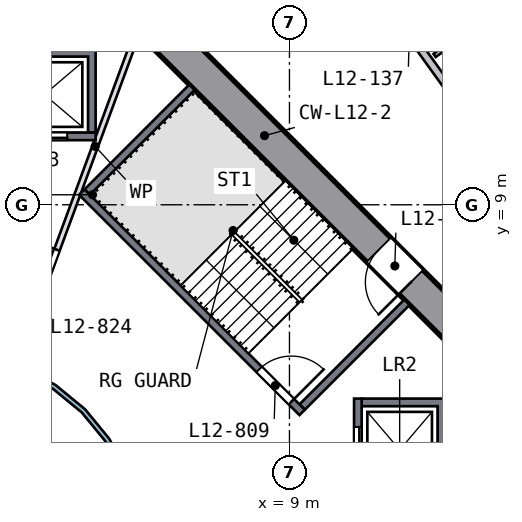
"""IFC4 building model, lengths in metres.
Left out: names, types, materials, properties, quantities, classifications, styles, units other than length and angle.
Written with IfcOpenShell. Run it as: python <this file> out.ifc"""

import sys

from ifc_helpers import new_model, si_unit, direction, frame, frame_2d, origin, place, context, subcontext, project, spatial, polyline, rectangle, outline, extrude, element, fill, save


model = new_model("IFC4")
c1 = context("Model", 3, precision=1e-05, world=origin(), true_north=direction((0.0, 1.0)))
c2 = subcontext(c1, "Body", "Model", "MODEL_VIEW")
j1 = project(units=[si_unit("LENGTHUNIT", "METRE"), si_unit("PLANEANGLEUNIT", "RADIAN")], contexts=[c1])
p1 = place(None, origin())
s1 = spatial("IfcSite", under=j1, at=p1, CompositionType="ELEMENT")
p2 = place(p1, origin())
s2 = spatial("IfcBuilding", under=s1, at=p2, CompositionType="ELEMENT")
p3 = place(p2, frame((0.0, 0.0, 56.5)))
s3 = spatial("IfcBuildingStorey", under=s2, at=p3, CompositionType="ELEMENT", Elevation=56.5)
p4 = place(p3, frame((13.682, 5.481, 0.0), z_axis=(0.0, 0.0, 1.0), x_axis=(-0.707106781, 0.707106781, 0.0)))
e1 = element("IfcWall", 1, at=p4, inside=s3, PredefinedType="SHEAR", context=c2, shape_type="SweptSolid", body=[
    extrude(rectangle(XDim=11.598, YDim=0.9, at=frame_2d((5.799, 0.0))), origin(), (0.0, 0.0, 1.0), 3.5),
])
p5 = place(p4, frame((2.099, 0.0, 0.0)))
e2 = element("IfcOpeningElement", 2, at=p5, cuts=e1, PredefinedType="OPENING", context=c2, shape_type="SweptSolid", body=[
    extrude(rectangle(XDim=1.2, YDim=2.1, at=frame_2d((0.6, 1.05))), frame((0.0, 0.46, 0.0), z_axis=(0.0, -1.0, 0.0), x_axis=(1.0, 0.0, 0.0)), (0.0, 0.0, 1.0), 0.92),
])
p6 = place(p3, origin())
e3 = element("IfcWall", 3, at=p6, inside=s3, PredefinedType="SOLIDWALL", context=c2, shape_type="SweptSolid", body=[
    extrude(outline(polyline([(13.1, 3.9), (13.1, 1.2), (10.9, 1.2), (10.9, 1.4), (12.9, 1.4), (12.9, 3.7), (10.9, 3.7), (10.9, 3.9), (13.1, 3.9)])), origin(), (0.0, 0.0, 1.0), 3.19),
])
p7 = place(p3, frame((10.8, 1.2, 0.0), z_axis=(0.0, 0.0, 1.0), x_axis=(0.0, 1.0, 0.0)))
e4 = element("IfcWall", 4, at=p7, inside=s3, PredefinedType="SOLIDWALL", context=c2, shape_type="SweptSolid", body=[
    extrude(rectangle(XDim=2.7, YDim=0.2, at=frame_2d((1.35, 0.0))), origin(), (0.0, 0.0, 1.0), 3.19),
])
p8 = place(p7, frame((0.75, 0.0, 0.0)))
e5 = element("IfcOpeningElement", 5, at=p8, cuts=e4, PredefinedType="OPENING", context=c2, shape_type="SweptSolid", body=[
    extrude(rectangle(XDim=1.2, YDim=2.1, at=frame_2d((0.6, 1.05))), frame((0.0, 0.11, 0.0), z_axis=(0.0, -1.0, 0.0), x_axis=(1.0, 0.0, 0.0)), (0.0, 0.0, 1.0), 0.22),
])
p9 = place(p3, origin())
e6 = element("IfcWall", 6, at=p9, inside=s3, PredefinedType="SOLIDWALL", context=c2, shape_type="SweptSolid", body=[
    extrude(outline(polyline([(3.9, 13.1), (3.9, 10.9), (3.7, 10.9), (3.7, 12.9), (1.4, 12.9), (1.4, 10.9), (1.2, 10.9), (1.2, 13.1), (3.9, 13.1)])), origin(), (0.0, 0.0, 1.0), 3.19),
])
p10 = place(p3, frame((1.2, 10.8, 0.0), z_axis=(0.0, 0.0, 1.0), x_axis=(1.0, 0.0, 0.0)))
e7 = element("IfcWall", 7, at=p10, inside=s3, PredefinedType="SOLIDWALL", context=c2, shape_type="SweptSolid", body=[
    extrude(rectangle(XDim=2.7, YDim=0.2, at=frame_2d((1.35, 0.0))), origin(), (0.0, 0.0, 1.0), 3.19),
])
p11 = place(p10, frame((0.75, 0.0, 0.0)))
e8 = element("IfcOpeningElement", 8, at=p11, cuts=e7, PredefinedType="OPENING", context=c2, shape_type="SweptSolid", body=[
    extrude(rectangle(XDim=1.2, YDim=2.1, at=frame_2d((0.6, 1.05))), frame((0.0, 0.11, 0.0), z_axis=(0.0, -1.0, 0.0), x_axis=(1.0, 0.0, 0.0)), (0.0, 0.0, 1.0), 0.22),
])
p12 = place(p3, frame((3.535, 9.334, 0.0), z_axis=(0.0, 0.0, 1.0), x_axis=(0.707106781, -0.707106781, 0.0)))
e9 = element("IfcWall", 9, at=p12, inside=s3, PredefinedType="SOLIDWALL", context=c2, shape_type="SweptSolid", body=[
    extrude(rectangle(XDim=8.2, YDim=0.2, at=frame_2d((4.1, 0.0))), origin(), (0.0, 0.0, 1.0), 3.19),
])
p13 = place(p12, frame((6.6, 0.0, 0.0)))
e10 = element("IfcOpeningElement", 10, at=p13, cuts=e9, PredefinedType="OPENING", context=c2, shape_type="SweptSolid", body=[
    extrude(rectangle(XDim=1.2, YDim=2.1, at=frame_2d((0.6, 1.05))), frame((0.0, 0.11, 0.0), z_axis=(0.0, -1.0, 0.0), x_axis=(1.0, 0.0, 0.0)), (0.0, 0.0, 1.0), 0.22),
])
for number, where, z_axis, x_axis in (
    (11, (9.334, 3.677, 0.0), (0.0, 0.0, 1.0), (0.707, 0.707, 0.0)),
    (12, (3.677, 9.334, 0.0), (0.0, 0.0, 1.0), (0.707, 0.707, 0.0)),
):
    element("IfcWall", number, at=place(p3, frame(where, z_axis=z_axis, x_axis=x_axis)), inside=s3, PredefinedType="SOLIDWALL", context=c2, shape_type="SweptSolid", body=[
        extrude(rectangle(XDim=3.9, YDim=0.2, at=frame_2d((1.95, 0.0))), origin(), (0.0, 0.0, 1.0), 3.19),
    ])
p14 = place(p3, frame((1.776, 4.813, 0.0), z_axis=(0.0, 0.0, 1.0), x_axis=(0.346112737, 0.93819293, 0.0)))
e13 = element("IfcWall", 13, at=p14, inside=s3, PredefinedType="PARTITIONING", context=c2, shape_type="SweptSolid", body=[
    extrude(rectangle(XDim=8.803, YDim=0.15, at=frame_2d((4.402, 0.0))), origin(), (0.0, 0.0, 1.0), 3.19),
])
p15 = place(p14, frame((1.4, 0.0, 0.0)))
e14 = element("IfcOpeningElement", 14, at=p15, cuts=e13, PredefinedType="OPENING", context=c2, shape_type="SweptSolid", body=[
    extrude(rectangle(XDim=1.8, YDim=2.1, at=frame_2d((0.9, 1.05))), frame((0.0, 0.085, 0.0), z_axis=(0.0, -1.0, 0.0), x_axis=(1.0, 0.0, 0.0)), (0.0, 0.0, 1.0), 0.17),
])
p16 = place(p3, origin())
e15 = element("IfcWall", 15, at=p16, inside=s3, PredefinedType="SOLIDWALL", context=c2, shape_type="SweptSolid", body=[
    extrude(outline(polyline([(5.021, -0.999), (4.73, -1.959), (4.257, -2.844), (3.62, -3.62), (2.844, -4.257), (1.959, -4.73), (0.999, -5.021), (0.0, -5.12), (-0.999, -5.021), (-1.959, -4.73), (-2.844, -4.257), (-3.62, -3.62), (-4.257, -2.844), (-4.73, -1.959), (-5.021, -0.999), (-5.12, 0.0), (-5.021, 0.999), (-4.73, 1.959), (-4.257, 2.844), (-3.62, 3.62), (-2.844, 4.257), (-1.959, 4.73), (-0.999, 5.021), (0.0, 5.12), (0.999, 5.021), (1.959, 4.73), (2.844, 4.257), (3.62, 3.62), (4.257, 2.844), (4.73, 1.959), (5.021, 0.999), (5.12, 0.0), (5.021, -0.999)]), holes=[polyline([(4.904, 0.976), (4.619, 1.913), (4.157, 2.778), (3.535, 3.535), (2.778, 4.157), (1.913, 4.619), (0.976, 4.904), (0.0, 5.0), (-0.976, 4.904), (-1.913, 4.619), (-2.778, 4.157), (-3.535, 3.535), (-4.157, 2.778), (-4.619, 1.913), (-4.904, 0.976), (-5.0, 0.0), (-4.904, -0.976), (-4.619, -1.913), (-4.157, -2.778), (-3.535, -3.535), (-2.778, -4.157), (-1.913, -4.619), (-0.976, -4.904), (0.0, -5.0), (0.976, -4.904), (1.913, -4.619), (2.778, -4.157), (3.535, -3.535), (4.157, -2.778), (4.619, -1.913), (4.904, -0.976), (5.0, 0.0), (4.904, 0.976)])]), origin(), (0.0, 0.0, 1.0), 3.19),
])
p17 = place(p3, frame((11.747, 14.076, 0.0), z_axis=(0.0, 0.0, 1.0), x_axis=(0.584392911, -0.811470841, 0.0)))
e16 = element("IfcWall", 16, at=p17, inside=s3, PredefinedType="SOLIDWALL", context=c2, shape_type="SweptSolid", body=[
    extrude(rectangle(XDim=9.116, YDim=0.2, at=frame_2d((4.558, 0.0))), origin(), (0.0, 0.0, 1.0), 3.19),
])
p18 = place(p17, frame((0.2, 0.0, 0.0)))
e17 = element("IfcOpeningElement", 17, at=p18, cuts=e16, PredefinedType="OPENING", context=c2, shape_type="SweptSolid", body=[
    extrude(rectangle(XDim=1.0, YDim=2.1, at=frame_2d((0.5, 1.05))), frame((0.0, 0.11, 0.0), z_axis=(0.0, -1.0, 0.0), x_axis=(1.0, 0.0, 0.0)), (0.0, 0.0, 1.0), 0.22),
])
p19 = place(p3, frame((15.416, 14.799, 0.0), z_axis=(0.0, 0.0, 1.0), x_axis=(-0.811459086, -0.584409233, 0.0)))
e18 = element("IfcWall", 18, at=p19, inside=s3, PredefinedType="PARTITIONING", context=c2, shape_type="SweptSolid", body=[
    extrude(rectangle(XDim=3.2, YDim=0.1, at=frame_2d((1.6, 0.0))), origin(), (0.0, 0.0, 1.0), 3.19),
])
p20 = place(p19, frame((1.25, 0.0, 0.0)))
e19 = element("IfcOpeningElement", 19, at=p20, cuts=e18, PredefinedType="OPENING", context=c2, shape_type="SweptSolid", body=[
    extrude(rectangle(XDim=0.9, YDim=2.1, at=frame_2d((0.45, 1.05))), frame((0.0, 0.06, 0.0), z_axis=(0.0, -1.0, 0.0), x_axis=(1.0, 0.0, 0.0)), (0.0, 0.0, 1.0), 0.12),
])
p21 = place(p8, origin())
e20 = element("IfcDoor", 20, at=p21, inside=s3, OperationType="DOUBLE_DOOR_SLIDING", PredefinedType="DOOR", context=c2, shape_type="SweptSolid", body=[
    extrude(rectangle(XDim=1.2, YDim=2.1, at=frame_2d((0.6, 1.05))), frame((0.0, 0.025, 0.0), z_axis=(0.0, -1.0, 0.0), x_axis=(1.0, 0.0, 0.0)), (0.0, 0.0, 1.0), 0.05),
])
fill(e5, e20)
p22 = place(p11, origin())
e21 = element("IfcDoor", 21, at=p22, inside=s3, OperationType="DOUBLE_DOOR_SLIDING", PredefinedType="DOOR", context=c2, shape_type="SweptSolid", body=[
    extrude(rectangle(XDim=1.2, YDim=2.1, at=frame_2d((0.6, 1.05))), frame((0.0, 0.025, 0.0), z_axis=(0.0, -1.0, 0.0), x_axis=(1.0, 0.0, 0.0)), (0.0, 0.0, 1.0), 0.05),
])
fill(e8, e21)
p23 = place(p13, origin())
e22 = element("IfcDoor", 22, at=p23, inside=s3, OperationType="SINGLE_SWING_RIGHT", PredefinedType="DOOR", context=c2, shape_type="SweptSolid", body=[
    extrude(rectangle(XDim=1.2, YDim=2.1, at=frame_2d((0.6, 1.05))), frame((0.0, 0.025, 0.0), z_axis=(0.0, -1.0, 0.0), x_axis=(1.0, 0.0, 0.0)), (0.0, 0.0, 1.0), 0.05),
])
fill(e10, e22)
p24 = place(p5, origin())
e23 = element("IfcDoor", 23, at=p24, inside=s3, OperationType="SINGLE_SWING_LEFT", PredefinedType="DOOR", context=c2, shape_type="SweptSolid", body=[
    extrude(rectangle(XDim=1.2, YDim=2.1, at=frame_2d((0.6, 1.05))), frame((0.0, 0.025, 0.0), z_axis=(0.0, -1.0, 0.0), x_axis=(1.0, 0.0, 0.0)), (0.0, 0.0, 1.0), 0.05),
])
fill(e2, e23)
p25 = place(p15, origin())
e24 = element("IfcDoor", 24, at=p25, inside=s3, OperationType="DOUBLE_DOOR_SINGLE_SWING", PredefinedType="DOOR", context=c2, shape_type="SweptSolid", body=[
    extrude(rectangle(XDim=1.8, YDim=2.1, at=frame_2d((0.9, 1.05))), frame((0.0, 0.025, 0.0), z_axis=(0.0, -1.0, 0.0), x_axis=(1.0, 0.0, 0.0)), (0.0, 0.0, 1.0), 0.05),
])
fill(e14, e24)
save(model, sys.argv[1])
